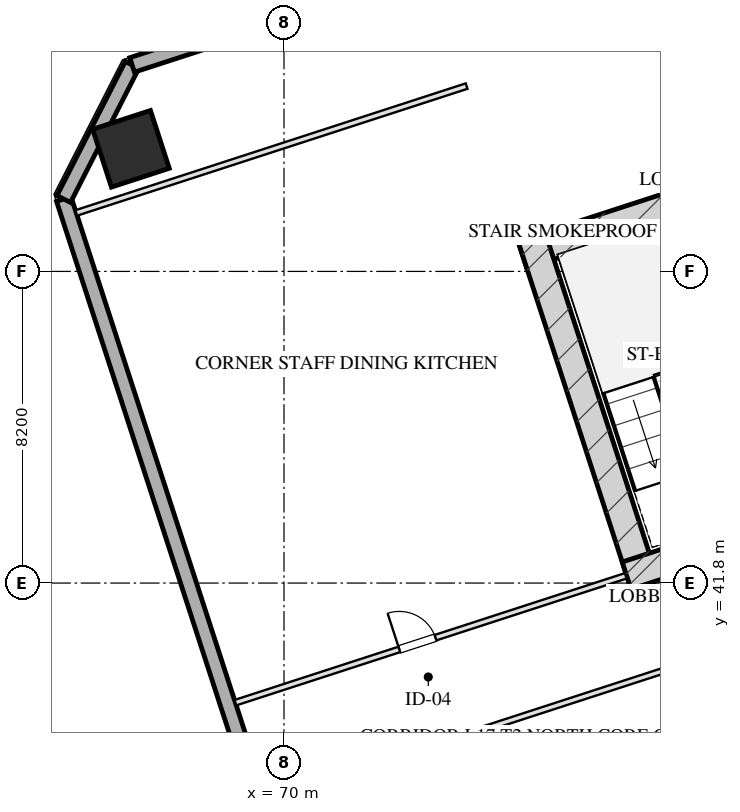
"""IFC4 building model, lengths in metres.
Left out: names, types, materials, properties, quantities, classifications, styles, units other than length and angle.
Written with IfcOpenShell. Run it as: python <this file> out.ifc"""

import sys

from ifc_helpers import new_model, si_unit, direction, frame, frame_2d, origin, origin_2d, place, context, subcontext, project, spatial, rectangle, hollow_rectangle, extrude, element, fill, save


model = new_model("IFC4")
c1 = context("Model", 3, precision=1e-05, world=origin(), true_north=direction((0.0, 1.0)))
c2 = subcontext(c1, "Body", "Model", "MODEL_VIEW")
j1 = project(units=[si_unit("LENGTHUNIT", "METRE"), si_unit("PLANEANGLEUNIT", "RADIAN")], contexts=[c1])
p1 = place(None, origin())
s1 = spatial("IfcSite", under=j1, at=p1, CompositionType="ELEMENT")
p2 = place(p1, origin())
s2 = spatial("IfcBuilding", under=s1, at=p2, CompositionType="ELEMENT")
p3 = place(p2, frame((0.0, 0.0, 71.3)))
s3 = spatial("IfcBuildingStorey", under=s2, at=p3, CompositionType="ELEMENT", Elevation=71.3)
p4 = place(p3, frame((76.272, 50.443, 0.0), z_axis=(0.0, 0.0, 1.0), x_axis=(0.951056072937, 0.309018358888, 0.0)))
e1 = element("IfcWall", 1, at=p4, inside=s3, PredefinedType="SHEAR", context=c2, shape_type="SweptSolid", body=[
    extrude(rectangle(XDim=16.55, YDim=0.75, at=frame_2d((8.275, 0.0))), origin(), (0.0, 0.0, 1.0), 3.45),
])
p5 = place(p3, frame((79.489, 41.756, 0.0), z_axis=(0.0, 0.0, 1.0), x_axis=(-0.309016134813, 0.951056795583, 0.0)))
e2 = element("IfcWall", 2, at=p5, inside=s3, PredefinedType="SHEAR", context=c2, shape_type="SweptSolid", body=[
    extrude(rectangle(XDim=9.63, YDim=0.75, at=frame_2d((4.815, 0.0))), origin(), (0.0, 0.0, 1.0), 3.45),
])
p6 = place(p3, frame((79.016, 41.997, 0.0), z_axis=(0.0, 0.0, 1.0), x_axis=(0.95106038264, 0.309005094736, 0.0)))
e3 = element("IfcWall", 3, at=p6, inside=s3, PredefinedType="SHEAR", context=c2, shape_type="SweptSolid", body=[
    extrude(rectangle(XDim=4.295, YDim=0.75, at=frame_2d((2.147, 0.0))), origin(), (0.0, 0.0, 1.0), 3.45),
])
p7 = place(p3, frame((65.973, 53.226, 0.0), z_axis=(0.0, 0.0, 1.0), x_axis=(0.951056516295, 0.309016994375, 0.0)))
e4 = element("IfcColumn", 4, at=p7, inside=s3, PredefinedType="COLUMN", context=c2, shape_type="SweptSolid", body=[
    extrude(hollow_rectangle(XDim=1.6, YDim=1.6, WallThickness=0.055, at=origin_2d()), origin(), (0.0, 0.0, 1.0), 3.451),
])
p8 = place(p3, frame((79.655, 4.352, 0.0), z_axis=(0.0, 0.0, 1.0), x_axis=(-0.309014526607, 0.951057318118, 0.0)))
e5 = element("IfcWall", 5, at=p8, inside=s3, PredefinedType="SOLIDWALL", context=c2, shape_type="SweptSolid", body=[
    extrude(rectangle(XDim=50.0, YDim=0.4, at=frame_2d((25.0, 0.0))), origin(), (0.0, 0.0, 1.0), 2.61),
])
p9 = place(p8, frame((17.35, 0.0, 0.75)))
e6 = element("IfcOpeningElement", 6, at=p9, cuts=e5, PredefinedType="OPENING", context=c2, shape_type="SweptSolid", body=[
    extrude(rectangle(XDim=2.5, YDim=1.46, at=frame_2d((1.25, 0.73))), frame((0.0, 0.21, 0.0), z_axis=(0.0, -1.0, 0.0), x_axis=(1.0, 0.0, 0.0)), (0.0, 0.0, 1.0), 0.42),
])
p10 = place(p8, frame((30.25, 0.0, 0.0)))
e7 = element("IfcOpeningElement", 7, at=p10, cuts=e5, PredefinedType="OPENING", context=c2, shape_type="SweptSolid", body=[
    extrude(rectangle(XDim=1.1, YDim=2.15, at=frame_2d((0.55, 1.075))), frame((0.0, 0.21, 0.0), z_axis=(0.0, -1.0, 0.0), x_axis=(1.0, 0.0, 0.0)), (0.0, 0.0, 1.0), 0.42),
])
p11 = place(p3, frame((64.205, 51.905, 0.0), z_axis=(0.0, 0.0, 1.0), x_axis=(0.453958106755, 0.891023028497, 0.0)))
e8 = element("IfcWall", 8, at=p11, inside=s3, PredefinedType="SOLIDWALL", context=c2, shape_type="SweptSolid", body=[
    extrude(rectangle(XDim=3.96, YDim=0.4, at=frame_2d((1.98, 0.0))), origin(), (0.0, 0.0, 1.0), 2.61),
])
p12 = place(p3, frame((66.002, 55.433, 0.0), z_axis=(0.0, 0.0, 1.0), x_axis=(0.951055939317, 0.309018770125, 0.0)))
e9 = element("IfcWall", 9, at=p12, inside=s3, PredefinedType="SOLIDWALL", context=c2, shape_type="SweptSolid", body=[
    extrude(rectangle(XDim=32.4, YDim=0.4, at=frame_2d((16.2, 0.0))), origin(), (0.0, 0.0, 1.0), 2.61),
])
p13 = place(p3, frame((64.534, 51.539, 0.0), z_axis=(0.0, 0.0, 1.0), x_axis=(0.951056658866, 0.309016555588, 0.0)))
e10 = element("IfcWall", 10, at=p13, inside=s3, PredefinedType="PARTITIONING", context=c2, shape_type="SweptSolid", body=[
    extrude(rectangle(XDim=10.8, YDim=0.15, at=frame_2d((5.4, 0.0))), origin(), (0.0, 0.0, 1.0), 3.175),
])
p14 = place(p3, frame((68.721, 38.652, 0.0), z_axis=(0.0, 0.0, 1.0), x_axis=(0.951056658866, 0.309016555588, 0.0)))
e11 = element("IfcWall", 11, at=p14, inside=s3, PredefinedType="PARTITIONING", context=c2, shape_type="SweptSolid", body=[
    extrude(rectangle(XDim=10.8, YDim=0.15, at=frame_2d((5.4, 0.0))), origin(), (0.0, 0.0, 1.0), 3.175),
])
p15 = place(p14, frame((4.536, 0.0, 0.0)))
e12 = element("IfcOpeningElement", 12, at=p15, cuts=e11, PredefinedType="OPENING", context=c2, shape_type="SweptSolid", body=[
    extrude(rectangle(XDim=1.0, YDim=2.05, at=frame_2d((0.5, 1.025))), frame((0.0, 0.085, 0.0), z_axis=(0.0, -1.0, 0.0), x_axis=(1.0, 0.0, 0.0)), (0.0, 0.0, 1.0), 0.17),
])
p16 = place(p3, frame((69.549, 36.103, 0.0), z_axis=(0.0, 0.0, 1.0), x_axis=(0.951057299418, 0.309014584159, 0.0)))
e13 = element("IfcWall", 13, at=p16, inside=s3, PredefinedType="PARTITIONING", context=c2, shape_type="SweptSolid", body=[
    extrude(rectangle(XDim=17.375, YDim=0.15, at=frame_2d((8.688, 0.0))), origin(), (0.0, 0.0, 1.0), 3.175),
])
p17 = place(p15, origin())
e14 = element("IfcDoor", 14, at=p17, inside=s3, OperationType="SINGLE_SWING_LEFT", PredefinedType="DOOR", context=c2, shape_type="SweptSolid", body=[
    extrude(rectangle(XDim=1.0, YDim=2.05, at=frame_2d((0.5, 1.025))), frame((0.0, 0.025, 0.0), z_axis=(0.0, -1.0, 0.0), x_axis=(1.0, 0.0, 0.0)), (0.0, 0.0, 1.0), 0.05),
])
fill(e12, e14)
save(model, sys.argv[1])
